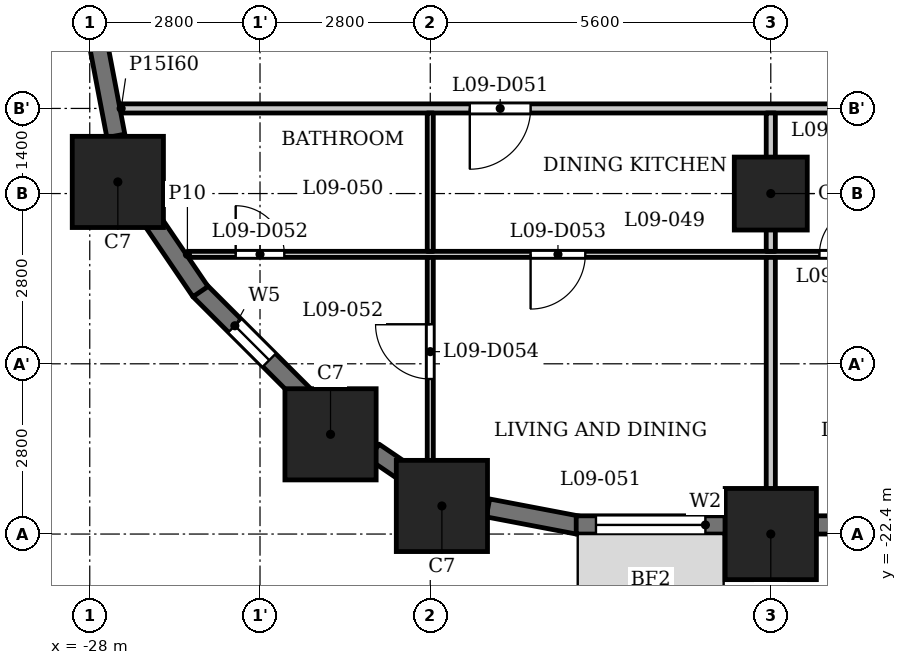
"""IFC4 building model, lengths in metres.
Left out: names, types, materials, properties, quantities, classifications, styles, units other than length and angle.
Written with IfcOpenShell. Run it as: python <this file> out.ifc"""

import sys

from ifc_helpers import new_model, si_unit, direction, frame, frame_2d, origin, origin_2d, place, context, subcontext, project, spatial, rectangle, extrude, element, fill, save


model = new_model("IFC4")
c1 = context("Model", 3, precision=1e-05, world=origin(), true_north=direction((0.0, 1.0)))
c2 = subcontext(c1, "Body", "Model", "MODEL_VIEW")
j1 = project(units=[si_unit("LENGTHUNIT", "METRE"), si_unit("PLANEANGLEUNIT", "RADIAN")], contexts=[c1])
p1 = place(None, origin())
s1 = spatial("IfcSite", under=j1, at=p1, CompositionType="ELEMENT")
p2 = place(p1, origin())
s2 = spatial("IfcBuilding", under=s1, at=p2, CompositionType="ELEMENT")
p3 = place(p2, frame((0.0, 0.0, 41.0)))
s3 = spatial("IfcBuildingStorey", under=s2, at=p3, CompositionType="ELEMENT", Elevation=41.0)
for number, where, z_axis, x_axis in (
    (1, (-22.209, -21.938, 0.0), (0.0, 0.0, 1.0), (1.0, 0.0, 0.0)),
    (2, (-16.8, -22.4, 0.0), (0.0, 0.0, 1.0), (1.0, 0.0, 0.0)),
    (3, (-27.538, -16.609, 0.0), (0.0, 0.0, 1.0), (1.0, 0.0, 0.0)),
    (4, (-24.04, -20.76, 0.0), (0.0, 0.0, 1.0), (1.0, 0.0, 0.0)),
):
    element("IfcColumn", number, at=place(p3, frame(where, z_axis=z_axis, x_axis=x_axis)), inside=s3, PredefinedType="COLUMN", context=c2, shape_type="SweptSolid", body=[
        extrude(rectangle(XDim=1.5, YDim=1.5, at=origin_2d()), origin(), (0.0, 0.0, 1.0), 3.5),
    ])
p4 = place(p3, frame((-16.8, -16.8, 0.0), z_axis=(0.0, 0.0, 1.0), x_axis=(1.0, 0.0, 0.0)))
e5 = element("IfcColumn", 5, at=p4, inside=s3, PredefinedType="COLUMN", context=c2, shape_type="SweptSolid", body=[
    extrude(rectangle(XDim=1.2, YDim=1.2, at=origin_2d()), origin(), (0.0, 0.0, 1.0), 3.5),
])
p5 = place(p3, frame((-26.197, -18.391, 0.0), z_axis=(0.0, 0.0, 1.0), x_axis=(0.707106781187, -0.707106781187, 0.0)))
e6 = element("IfcWall", 6, at=p5, inside=s3, PredefinedType="SOLIDWALL", context=c2, shape_type="SweptSolid", body=[
    extrude(rectangle(XDim=2.45, YDim=0.3, at=frame_2d((1.225, 0.0))), origin(), (0.0, 0.0, 1.0), 2.35),
])
p6 = place(p5, frame((0.825, 0.0, 0.6)))
e7 = element("IfcOpeningElement", 7, at=p6, cuts=e6, PredefinedType="OPENING", context=c2, shape_type="SweptSolid", body=[
    extrude(rectangle(XDim=0.8, YDim=1.55, at=frame_2d((0.4, 0.775))), frame((0.0, 0.16, 0.0), z_axis=(0.0, -1.0, 0.0), x_axis=(1.0, 0.0, 0.0)), (0.0, 0.0, 1.0), 0.32),
])
p7 = place(p3, frame((-23.327, -21.045, 0.0), z_axis=(0.0, 0.0, 1.0), x_axis=(0.827080706709, -0.562083182981, 0.0)))
e8 = element("IfcWall", 8, at=p7, inside=s3, PredefinedType="SOLIDWALL", context=c2, shape_type="SweptSolid", body=[
    extrude(rectangle(XDim=0.677, YDim=0.3, at=frame_2d((0.339, 0.0))), origin(), (0.0, 0.0, 1.0), 3.2),
])
p8 = place(p3, frame((-21.451, -21.97, 0.0), z_axis=(0.0, 0.0, 1.0), x_axis=(0.982287454367, -0.187380247071, 0.0)))
e9 = element("IfcWall", 9, at=p8, inside=s3, PredefinedType="SOLIDWALL", context=c2, shape_type="SweptSolid", body=[
    extrude(rectangle(XDim=1.506, YDim=0.3, at=frame_2d((0.753, 0.0))), origin(), (0.0, 0.0, 1.0), 2.35),
])
p9 = place(p3, frame((-20.0, -22.25, 0.0), z_axis=(0.0, 0.0, 1.0), x_axis=(1.0, 0.0, 0.0)))
e10 = element("IfcWall", 10, at=p9, inside=s3, PredefinedType="SOLIDWALL", context=c2, shape_type="SweptSolid", body=[
    extrude(rectangle(XDim=2.45, YDim=0.3, at=frame_2d((1.225, 0.0))), origin(), (0.0, 0.0, 1.0), 2.35),
])
p10 = place(p9, frame((0.325, 0.0, 0.9)))
e11 = element("IfcOpeningElement", 11, at=p10, cuts=e10, PredefinedType="OPENING", context=c2, shape_type="SweptSolid", body=[
    extrude(rectangle(XDim=1.8, YDim=1.25, at=frame_2d((0.9, 0.625))), frame((0.0, 0.16, 0.0), z_axis=(0.0, -1.0, 0.0), x_axis=(1.0, 0.0, 0.0)), (0.0, 0.0, 1.0), 0.32),
])
p11 = place(p3, frame((-16.05, -22.25, 0.0), z_axis=(0.0, 0.0, 1.0), x_axis=(1.0, 0.0, 0.0)))
e12 = element("IfcWall", 12, at=p11, inside=s3, PredefinedType="SOLIDWALL", context=c2, shape_type="SweptSolid", body=[
    extrude(rectangle(XDim=4.1, YDim=0.3, at=frame_2d((2.05, 0.0))), origin(), (0.0, 0.0, 1.0), 2.35),
])
p12 = place(p11, frame((0.25, 0.0, 1.2)))
e13 = element("IfcOpeningElement", 13, at=p12, cuts=e12, PredefinedType="OPENING", context=c2, shape_type="SweptSolid", body=[
    extrude(rectangle(XDim=3.6, YDim=0.95, at=frame_2d((1.8, 0.475))), frame((0.0, 0.16, 0.0), z_axis=(0.0, -1.0, 0.0), x_axis=(1.0, 0.0, 0.0)), (0.0, 0.0, 1.0), 0.32),
])
for number, where, z_axis, x_axis in (
    (14, (-27.853, -14.372, 0.0), (0.0, 0.0, 1.0), (0.187, -0.982, 0.0)),
    (15, (-27.025, -17.167, 0.0), (0.0, 0.0, 1.0), (0.562, -0.827, 0.0)),
):
    element("IfcWall", number, at=place(p3, frame(where, z_axis=z_axis, x_axis=x_axis)), inside=s3, PredefinedType="SOLIDWALL", context=c2, shape_type="SweptSolid", body=[
        extrude(rectangle(XDim=1.506, YDim=0.3, at=frame_2d((0.753, 0.0))), origin(), (0.0, 0.0, 1.0), 2.35),
    ])
p13 = place(p3, frame((-26.394, -17.8, 0.0), z_axis=(0.0, 0.0, 1.0), x_axis=(1.0, 0.0, 0.0)))
e16 = element("IfcWall", 16, at=p13, inside=s3, PredefinedType="PARTITIONING", context=c2, shape_type="SweptSolid", body=[
    extrude(rectangle(XDim=53.126, YDim=0.1, at=frame_2d((26.563, 0.0))), origin(), (0.0, 0.0, 1.0), 3.2),
])
p14 = place(p13, frame((0.794, 0.0, 0.0)))
e17 = element("IfcOpeningElement", 17, at=p14, cuts=e16, PredefinedType="OPENING", context=c2, shape_type="SweptSolid", body=[
    extrude(rectangle(XDim=0.8, YDim=2.1, at=frame_2d((0.4, 1.05))), frame((0.0, 0.06, 0.0), z_axis=(0.0, -1.0, 0.0), x_axis=(1.0, 0.0, 0.0)), (0.0, 0.0, 1.0), 0.12),
])
p15 = place(p13, frame((5.644, 0.0, 0.0)))
e18 = element("IfcOpeningElement", 18, at=p15, cuts=e16, PredefinedType="OPENING", context=c2, shape_type="SweptSolid", body=[
    extrude(rectangle(XDim=0.9, YDim=2.1, at=frame_2d((0.45, 1.05))), frame((0.0, 0.06, 0.0), z_axis=(0.0, -1.0, 0.0), x_axis=(1.0, 0.0, 0.0)), (0.0, 0.0, 1.0), 0.12),
])
p16 = place(p13, frame((10.394, 0.0, 0.0)))
e19 = element("IfcOpeningElement", 19, at=p16, cuts=e16, PredefinedType="OPENING", context=c2, shape_type="SweptSolid", body=[
    extrude(rectangle(XDim=0.8, YDim=2.1, at=frame_2d((0.4, 1.05))), frame((0.0, 0.06, 0.0), z_axis=(0.0, -1.0, 0.0), x_axis=(1.0, 0.0, 0.0)), (0.0, 0.0, 1.0), 0.12),
])
p17 = place(p13, frame((13.244, 0.0, 0.0)))
e20 = element("IfcOpeningElement", 20, at=p17, cuts=e16, PredefinedType="OPENING", context=c2, shape_type="SweptSolid", body=[
    extrude(rectangle(XDim=0.9, YDim=2.1, at=frame_2d((0.45, 1.05))), frame((0.0, 0.06, 0.0), z_axis=(0.0, -1.0, 0.0), x_axis=(1.0, 0.0, 0.0)), (0.0, 0.0, 1.0), 0.12),
])
p18 = place(p13, frame((23.944, 0.0, 0.0)))
e21 = element("IfcOpeningElement", 21, at=p18, cuts=e16, PredefinedType="OPENING", context=c2, shape_type="SweptSolid", body=[
    extrude(rectangle(XDim=0.8, YDim=2.1, at=frame_2d((0.4, 1.05))), frame((0.0, 0.06, 0.0), z_axis=(0.0, -1.0, 0.0), x_axis=(1.0, 0.0, 0.0)), (0.0, 0.0, 1.0), 0.12),
])
p19 = place(p13, frame((22.194, 0.0, 0.0)))
e22 = element("IfcOpeningElement", 22, at=p19, cuts=e16, PredefinedType="OPENING", context=c2, shape_type="SweptSolid", body=[
    extrude(rectangle(XDim=0.9, YDim=2.1, at=frame_2d((0.45, 1.05))), frame((0.0, 0.06, 0.0), z_axis=(0.0, -1.0, 0.0), x_axis=(1.0, 0.0, 0.0)), (0.0, 0.0, 1.0), 0.12),
])
p20 = place(p13, frame((16.594, 0.0, 0.0)))
e23 = element("IfcOpeningElement", 23, at=p20, cuts=e16, PredefinedType="OPENING", context=c2, shape_type="SweptSolid", body=[
    extrude(rectangle(XDim=0.9, YDim=2.1, at=frame_2d((0.45, 1.05))), frame((0.0, 0.06, 0.0), z_axis=(0.0, -1.0, 0.0), x_axis=(1.0, 0.0, 0.0)), (0.0, 0.0, 1.0), 0.12),
])
p21 = place(p13, frame((18.844, 0.0, 0.0)))
e24 = element("IfcOpeningElement", 24, at=p21, cuts=e16, PredefinedType="OPENING", context=c2, shape_type="SweptSolid", body=[
    extrude(rectangle(XDim=0.9, YDim=2.1, at=frame_2d((0.45, 1.05))), frame((0.0, 0.06, 0.0), z_axis=(0.0, -1.0, 0.0), x_axis=(1.0, 0.0, 0.0)), (0.0, 0.0, 1.0), 0.12),
])
p22 = place(p13, frame((30.544, 0.0, 0.0)))
e25 = element("IfcOpeningElement", 25, at=p22, cuts=e16, PredefinedType="OPENING", context=c2, shape_type="SweptSolid", body=[
    extrude(rectangle(XDim=0.8, YDim=2.1, at=frame_2d((0.4, 1.05))), frame((0.0, 0.06, 0.0), z_axis=(0.0, -1.0, 0.0), x_axis=(1.0, 0.0, 0.0)), (0.0, 0.0, 1.0), 0.12),
])
p23 = place(p13, frame((27.294, 0.0, 0.0)))
e26 = element("IfcOpeningElement", 26, at=p23, cuts=e16, PredefinedType="OPENING", context=c2, shape_type="SweptSolid", body=[
    extrude(rectangle(XDim=0.9, YDim=2.1, at=frame_2d((0.45, 1.05))), frame((0.0, 0.06, 0.0), z_axis=(0.0, -1.0, 0.0), x_axis=(1.0, 0.0, 0.0)), (0.0, 0.0, 1.0), 0.12),
])
p24 = place(p13, frame((35.894, 0.0, 0.0)))
e27 = element("IfcOpeningElement", 27, at=p24, cuts=e16, PredefinedType="OPENING", context=c2, shape_type="SweptSolid", body=[
    extrude(rectangle(XDim=0.8, YDim=2.1, at=frame_2d((0.4, 1.05))), frame((0.0, 0.06, 0.0), z_axis=(0.0, -1.0, 0.0), x_axis=(1.0, 0.0, 0.0)), (0.0, 0.0, 1.0), 0.12),
])
p25 = place(p13, frame((33.644, 0.0, 0.0)))
e28 = element("IfcOpeningElement", 28, at=p25, cuts=e16, PredefinedType="OPENING", context=c2, shape_type="SweptSolid", body=[
    extrude(rectangle(XDim=0.9, YDim=2.1, at=frame_2d((0.45, 1.05))), frame((0.0, 0.06, 0.0), z_axis=(0.0, -1.0, 0.0), x_axis=(1.0, 0.0, 0.0)), (0.0, 0.0, 1.0), 0.12),
])
p26 = place(p13, frame((41.494, 0.0, 0.0)))
e29 = element("IfcOpeningElement", 29, at=p26, cuts=e16, PredefinedType="OPENING", context=c2, shape_type="SweptSolid", body=[
    extrude(rectangle(XDim=0.8, YDim=2.1, at=frame_2d((0.4, 1.05))), frame((0.0, 0.06, 0.0), z_axis=(0.0, -1.0, 0.0), x_axis=(1.0, 0.0, 0.0)), (0.0, 0.0, 1.0), 0.12),
])
p27 = place(p13, frame((38.744, 0.0, 0.0)))
e30 = element("IfcOpeningElement", 30, at=p27, cuts=e16, PredefinedType="OPENING", context=c2, shape_type="SweptSolid", body=[
    extrude(rectangle(XDim=0.9, YDim=2.1, at=frame_2d((0.45, 1.05))), frame((0.0, 0.06, 0.0), z_axis=(0.0, -1.0, 0.0), x_axis=(1.0, 0.0, 0.0)), (0.0, 0.0, 1.0), 0.12),
])
p28 = place(p13, frame((49.362, 0.0, 0.0)))
e31 = element("IfcOpeningElement", 31, at=p28, cuts=e16, PredefinedType="OPENING", context=c2, shape_type="SweptSolid", body=[
    extrude(rectangle(XDim=0.8, YDim=2.1, at=frame_2d((0.4, 1.05))), frame((0.0, 0.06, 0.0), z_axis=(0.0, -1.0, 0.0), x_axis=(1.0, 0.0, 0.0)), (0.0, 0.0, 1.0), 0.12),
])
p29 = place(p13, frame((45.094, 0.0, 0.0)))
e32 = element("IfcOpeningElement", 32, at=p29, cuts=e16, PredefinedType="OPENING", context=c2, shape_type="SweptSolid", body=[
    extrude(rectangle(XDim=0.9, YDim=2.1, at=frame_2d((0.45, 1.05))), frame((0.0, 0.06, 0.0), z_axis=(0.0, -1.0, 0.0), x_axis=(1.0, 0.0, 0.0)), (0.0, 0.0, 1.0), 0.12),
])
p30 = place(p3, frame((-27.484, -15.4, 0.0), z_axis=(0.0, 0.0, 1.0), x_axis=(1.0, 0.0, 0.0)))
e33 = element("IfcWall", 33, at=p30, inside=s3, PredefinedType="PARTITIONING", context=c2, shape_type="SweptSolid", body=[
    extrude(rectangle(XDim=54.968, YDim=0.15, at=frame_2d((27.484, 0.0))), origin(), (0.0, 0.0, 1.0), 3.2),
])
p31 = place(p30, frame((5.734, 0.0, 0.0)))
e34 = element("IfcOpeningElement", 34, at=p31, cuts=e33, PredefinedType="OPENING", context=c2, shape_type="SweptSolid", body=[
    extrude(rectangle(XDim=1.0, YDim=2.1, at=frame_2d((0.5, 1.05))), frame((0.0, 0.085, 0.0), z_axis=(0.0, -1.0, 0.0), x_axis=(1.0, 0.0, 0.0)), (0.0, 0.0, 1.0), 0.17),
])
p32 = place(p30, frame((13.334, 0.0, 0.0)))
e35 = element("IfcOpeningElement", 35, at=p32, cuts=e33, PredefinedType="OPENING", context=c2, shape_type="SweptSolid", body=[
    extrude(rectangle(XDim=1.0, YDim=2.1, at=frame_2d((0.5, 1.05))), frame((0.0, 0.085, 0.0), z_axis=(0.0, -1.0, 0.0), x_axis=(1.0, 0.0, 0.0)), (0.0, 0.0, 1.0), 0.17),
])
p33 = place(p30, frame((20.184, 0.0, 0.0)))
e36 = element("IfcOpeningElement", 36, at=p33, cuts=e33, PredefinedType="OPENING", context=c2, shape_type="SweptSolid", body=[
    extrude(rectangle(XDim=1.0, YDim=2.1, at=frame_2d((0.5, 1.05))), frame((0.0, 0.085, 0.0), z_axis=(0.0, -1.0, 0.0), x_axis=(1.0, 0.0, 0.0)), (0.0, 0.0, 1.0), 0.17),
])
p34 = place(p30, frame((29.384, 0.0, 0.0)))
e37 = element("IfcOpeningElement", 37, at=p34, cuts=e33, PredefinedType="OPENING", context=c2, shape_type="SweptSolid", body=[
    extrude(rectangle(XDim=1.0, YDim=2.1, at=frame_2d((0.5, 1.05))), frame((0.0, 0.085, 0.0), z_axis=(0.0, -1.0, 0.0), x_axis=(1.0, 0.0, 0.0)), (0.0, 0.0, 1.0), 0.17),
])
p35 = place(p30, frame((33.734, 0.0, 0.0)))
e38 = element("IfcOpeningElement", 38, at=p35, cuts=e33, PredefinedType="OPENING", context=c2, shape_type="SweptSolid", body=[
    extrude(rectangle(XDim=1.0, YDim=2.1, at=frame_2d((0.5, 1.05))), frame((0.0, 0.085, 0.0), z_axis=(0.0, -1.0, 0.0), x_axis=(1.0, 0.0, 0.0)), (0.0, 0.0, 1.0), 0.17),
])
p36 = place(p30, frame((39.584, 0.0, 0.0)))
e39 = element("IfcOpeningElement", 39, at=p36, cuts=e33, PredefinedType="OPENING", context=c2, shape_type="SweptSolid", body=[
    extrude(rectangle(XDim=1.0, YDim=2.1, at=frame_2d((0.5, 1.05))), frame((0.0, 0.085, 0.0), z_axis=(0.0, -1.0, 0.0), x_axis=(1.0, 0.0, 0.0)), (0.0, 0.0, 1.0), 0.17),
])
p37 = place(p30, frame((45.184, 0.0, 0.0)))
e40 = element("IfcOpeningElement", 40, at=p37, cuts=e33, PredefinedType="OPENING", context=c2, shape_type="SweptSolid", body=[
    extrude(rectangle(XDim=1.0, YDim=2.1, at=frame_2d((0.5, 1.05))), frame((0.0, 0.085, 0.0), z_axis=(0.0, -1.0, 0.0), x_axis=(1.0, 0.0, 0.0)), (0.0, 0.0, 1.0), 0.17),
])
p38 = place(p3, frame((-22.4, -21.72, 0.0), z_axis=(0.0, 0.0, 1.0), x_axis=(0.0, 1.0, 0.0)))
e41 = element("IfcWall", 41, at=p38, inside=s3, PredefinedType="PARTITIONING", context=c2, shape_type="SweptSolid", body=[
    extrude(rectangle(XDim=3.87, YDim=0.1, at=frame_2d((1.935, 0.0))), origin(), (0.0, 0.0, 1.0), 3.2),
])
p39 = place(p38, frame((1.87, 0.0, 0.0)))
e42 = element("IfcOpeningElement", 42, at=p39, cuts=e41, PredefinedType="OPENING", context=c2, shape_type="SweptSolid", body=[
    extrude(rectangle(XDim=0.9, YDim=2.1, at=frame_2d((0.45, 1.05))), frame((0.0, 0.06, 0.0), z_axis=(0.0, -1.0, 0.0), x_axis=(1.0, 0.0, 0.0)), (0.0, 0.0, 1.0), 0.12),
])
p40 = place(p3, frame((-22.4, -17.75, 0.0), z_axis=(0.0, 0.0, 1.0), x_axis=(0.0, 1.0, 0.0)))
e43 = element("IfcWall", 43, at=p40, inside=s3, PredefinedType="PARTITIONING", context=c2, shape_type="SweptSolid", body=[
    extrude(rectangle(XDim=2.275, YDim=0.1, at=frame_2d((1.137, 0.0))), origin(), (0.0, 0.0, 1.0), 3.2),
])
p41 = place(p3, frame((-16.8, -23.13, 0.0), z_axis=(0.0, 0.0, 1.0), x_axis=(0.0, 1.0, 0.0)))
e44 = element("IfcWall", 44, at=p41, inside=s3, PredefinedType="PARTITIONING", context=c2, shape_type="SweptSolid", body=[
    extrude(rectangle(XDim=5.28, YDim=0.15, at=frame_2d((2.64, 0.0))), origin(), (0.0, 0.0, 1.0), 3.2),
])
p42 = place(p3, frame((-16.8, -17.75, 0.0), z_axis=(0.0, 0.0, 1.0), x_axis=(0.0, 1.0, 0.0)))
e45 = element("IfcWall", 45, at=p42, inside=s3, PredefinedType="PARTITIONING", context=c2, shape_type="SweptSolid", body=[
    extrude(rectangle(XDim=2.275, YDim=0.15, at=frame_2d((1.137, 0.0))), origin(), (0.0, 0.0, 1.0), 3.2),
])
p43 = place(p31, origin())
e46 = element("IfcDoor", 46, at=p43, inside=s3, OperationType="SINGLE_SWING_LEFT", PredefinedType="DOOR", context=c2, shape_type="SweptSolid", body=[
    extrude(rectangle(XDim=1.0, YDim=2.1, at=frame_2d((0.5, 1.05))), frame((0.0, 0.025, 0.0), z_axis=(0.0, -1.0, 0.0), x_axis=(1.0, 0.0, 0.0)), (0.0, 0.0, 1.0), 0.05),
])
fill(e34, e46)
p44 = place(p14, origin())
e47 = element("IfcDoor", 47, at=p44, inside=s3, OperationType="SINGLE_SWING_RIGHT", PredefinedType="DOOR", context=c2, shape_type="SweptSolid", body=[
    extrude(rectangle(XDim=0.8, YDim=2.1, at=frame_2d((0.4, 1.05))), frame((0.0, 0.025, 0.0), z_axis=(0.0, -1.0, 0.0), x_axis=(1.0, 0.0, 0.0)), (0.0, 0.0, 1.0), 0.05),
])
fill(e17, e47)
p45 = place(p15, origin())
e48 = element("IfcDoor", 48, at=p45, inside=s3, OperationType="SINGLE_SWING_LEFT", PredefinedType="DOOR", context=c2, shape_type="SweptSolid", body=[
    extrude(rectangle(XDim=0.9, YDim=2.1, at=frame_2d((0.45, 1.05))), frame((0.0, 0.025, 0.0), z_axis=(0.0, -1.0, 0.0), x_axis=(1.0, 0.0, 0.0)), (0.0, 0.0, 1.0), 0.05),
])
fill(e18, e48)
p46 = place(p39, origin())
e49 = element("IfcDoor", 49, at=p46, inside=s3, OperationType="SINGLE_SWING_LEFT", PredefinedType="DOOR", context=c2, shape_type="SweptSolid", body=[
    extrude(rectangle(XDim=0.9, YDim=2.1, at=frame_2d((0.45, 1.05))), frame((0.0, 0.025, 0.0), z_axis=(0.0, -1.0, 0.0), x_axis=(1.0, 0.0, 0.0)), (0.0, 0.0, 1.0), 0.05),
])
fill(e42, e49)
p47 = place(p16, origin())
e50 = element("IfcDoor", 50, at=p47, inside=s3, OperationType="SINGLE_SWING_LEFT", PredefinedType="DOOR", context=c2, shape_type="SweptSolid", body=[
    extrude(rectangle(XDim=0.8, YDim=2.1, at=frame_2d((0.4, 1.05))), frame((0.0, 0.025, 0.0), z_axis=(0.0, -1.0, 0.0), x_axis=(1.0, 0.0, 0.0)), (0.0, 0.0, 1.0), 0.05),
])
fill(e19, e50)
p48 = place(p6, origin())
e51 = element("IfcWindow", 51, at=p48, inside=s3, PartitioningType="SINGLE_PANEL", PredefinedType="WINDOW", context=c2, shape_type="SweptSolid", body=[
    extrude(rectangle(XDim=0.8, YDim=1.55, at=frame_2d((0.4, 0.775))), frame((0.0, 0.03, 0.0), z_axis=(0.0, -1.0, 0.0), x_axis=(1.0, 0.0, 0.0)), (0.0, 0.0, 1.0), 0.06),
])
fill(e7, e51)
p49 = place(p10, origin())
e52 = element("IfcWindow", 52, at=p49, inside=s3, PartitioningType="SINGLE_PANEL", PredefinedType="WINDOW", context=c2, shape_type="SweptSolid", body=[
    extrude(rectangle(XDim=1.8, YDim=1.25, at=frame_2d((0.9, 0.625))), frame((0.0, 0.03, 0.0), z_axis=(0.0, -1.0, 0.0), x_axis=(1.0, 0.0, 0.0)), (0.0, 0.0, 1.0), 0.06),
])
fill(e11, e52)
save(model, sys.argv[1])
